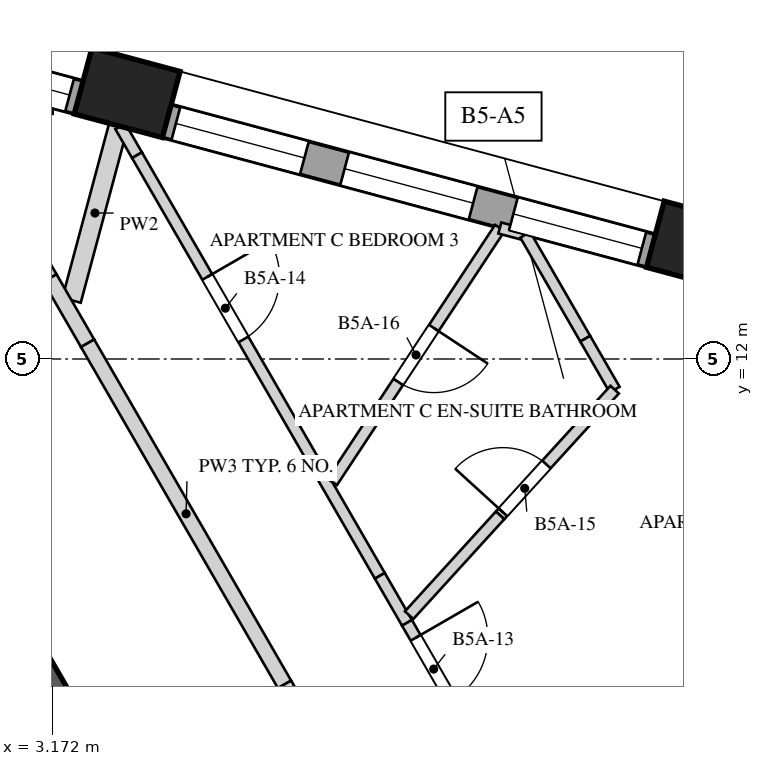
"""IFC4 building model, lengths in metres.
Left out: names, types, materials, properties, quantities, classifications, styles, units other than length and angle.
Written with IfcOpenShell. Run it as: python <this file> out.ifc"""

import sys

from ifc_helpers import new_model, si_unit, direction, frame, frame_2d, origin, origin_2d, place, context, subcontext, project, spatial, rectangle, extrude, element, fill, save


model = new_model("IFC4")
c1 = context("Model", 3, precision=1e-05, world=origin(), true_north=direction((0.0, 1.0)))
c2 = subcontext(c1, "Body", "Model", "MODEL_VIEW")
j1 = project(units=[si_unit("LENGTHUNIT", "METRE"), si_unit("PLANEANGLEUNIT", "RADIAN")], contexts=[c1])
p1 = place(None, origin())
s1 = spatial("IfcSite", under=j1, at=p1, CompositionType="ELEMENT")
p2 = place(p1, origin())
s2 = spatial("IfcBuilding", under=s1, at=p2, CompositionType="ELEMENT")
p3 = place(p2, frame((0.0, 0.0, 200.0)))
s3 = spatial("IfcBuildingStorey", under=s2, at=p3, CompositionType="ELEMENT", Elevation=200.0)
p4 = place(p3, frame((9.815, -4.25, 0.0), z_axis=(0.0, 0.0, 1.0), x_axis=(-0.500002161919, 0.866024155596, 0.0)))
e1 = element("IfcWall", 1, at=p4, inside=s3, PredefinedType="SHEAR", context=c2, shape_type="SweptSolid", body=[
    extrude(rectangle(XDim=17.176, YDim=0.75, at=frame_2d((8.588, 0.0))), origin(), (0.0, 0.0, 1.0), 4.0),
])
p5 = place(p4, frame((6.863, 0.0, 0.0)))
e2 = element("IfcOpeningElement", 2, at=p5, cuts=e1, PredefinedType="OPENING", context=c2, shape_type="SweptSolid", body=[
    extrude(rectangle(XDim=1.0, YDim=2.4, at=frame_2d((0.5, 1.2))), frame((0.0, 0.385, 0.0), z_axis=(0.0, -1.0, 0.0), x_axis=(1.0, 0.0, 0.0)), (0.0, 0.0, 1.0), 0.77),
])
for number, where, z_axis, x_axis in (
    (3, (11.683, 13.486, -0.35), (0.0, 0.0, 1.0), (-0.966, 0.259, 0.0)),
    (4, (4.154, 15.503, -0.35), (0.0, 0.0, 1.0), (-0.966, 0.259, 0.0)),
):
    element("IfcColumn", number, at=place(p3, frame(where, z_axis=z_axis, x_axis=x_axis)), inside=s3, PredefinedType="COLUMN", context=c2, shape_type="SweptSolid", body=[
        extrude(rectangle(XDim=1.2, YDim=0.9, at=origin_2d()), origin(), (0.0, 0.0, 1.0), 4.35),
    ])
p6 = place(p3, frame((11.045, 13.424, 0.0), z_axis=(0.0, 0.0, 1.0), x_axis=(-0.965933178973, 0.258791602952, 0.0)))
e5 = element("IfcWall", 5, at=p6, inside=s3, PredefinedType="SOLIDWALL", context=c2, shape_type="SweptSolid", body=[
    extrude(rectangle(XDim=6.594, YDim=0.45, at=frame_2d((3.297, 0.0))), origin(), (0.0, 0.0, 1.0), 3.3),
])
p7 = place(p6, frame((0.124, 0.0, 0.5)))
e6 = element("IfcOpeningElement", 6, at=p7, cuts=e5, PredefinedType="OPENING", context=c2, shape_type="SweptSolid", body=[
    extrude(rectangle(XDim=1.75, YDim=2.65, at=frame_2d((0.875, 1.325))), frame((0.0, 0.235, 0.0), z_axis=(0.0, -1.0, 0.0), x_axis=(1.0, 0.0, 0.0)), (0.0, 0.0, 1.0), 0.47),
])
p8 = place(p6, frame((2.422, 0.0, 0.5)))
e7 = element("IfcOpeningElement", 7, at=p8, cuts=e5, PredefinedType="OPENING", context=c2, shape_type="SweptSolid", body=[
    extrude(rectangle(XDim=1.75, YDim=2.65, at=frame_2d((0.875, 1.325))), frame((0.0, 0.235, 0.0), z_axis=(0.0, -1.0, 0.0), x_axis=(1.0, 0.0, 0.0)), (0.0, 0.0, 1.0), 0.47),
])
p9 = place(p6, frame((4.72, 0.0, 0.5)))
e8 = element("IfcOpeningElement", 8, at=p9, cuts=e5, PredefinedType="OPENING", context=c2, shape_type="SweptSolid", body=[
    extrude(rectangle(XDim=1.75, YDim=2.65, at=frame_2d((0.875, 1.325))), frame((0.0, 0.235, 0.0), z_axis=(0.0, -1.0, 0.0), x_axis=(1.0, 0.0, 0.0)), (0.0, 0.0, 1.0), 0.47),
])
p10 = place(p3, frame((3.516, 15.441, 0.0), z_axis=(0.0, 0.0, 1.0), x_axis=(-0.965933178973, 0.258791602952, 0.0)))
e9 = element("IfcWall", 9, at=p10, inside=s3, PredefinedType="SOLIDWALL", context=c2, shape_type="SweptSolid", body=[
    extrude(rectangle(XDim=6.594, YDim=0.45, at=frame_2d((3.297, 0.0))), origin(), (0.0, 0.0, 1.0), 3.3),
])
p11 = place(p10, frame((0.124, 0.0, 0.5)))
e10 = element("IfcOpeningElement", 10, at=p11, cuts=e9, PredefinedType="OPENING", context=c2, shape_type="SweptSolid", body=[
    extrude(rectangle(XDim=1.75, YDim=2.65, at=frame_2d((0.875, 1.325))), frame((0.0, 0.235, 0.0), z_axis=(0.0, -1.0, 0.0), x_axis=(1.0, 0.0, 0.0)), (0.0, 0.0, 1.0), 0.47),
])
p12 = place(p10, frame((2.422, 0.0, 0.5)))
e11 = element("IfcOpeningElement", 11, at=p12, cuts=e9, PredefinedType="OPENING", context=c2, shape_type="SweptSolid", body=[
    extrude(rectangle(XDim=1.75, YDim=2.65, at=frame_2d((0.875, 1.325))), frame((0.0, 0.235, 0.0), z_axis=(0.0, -1.0, 0.0), x_axis=(1.0, 0.0, 0.0)), (0.0, 0.0, 1.0), 0.47),
])
p13 = place(p10, frame((4.72, 0.0, 0.5)))
e12 = element("IfcOpeningElement", 12, at=p13, cuts=e9, PredefinedType="OPENING", context=c2, shape_type="SweptSolid", body=[
    extrude(rectangle(XDim=1.75, YDim=2.65, at=frame_2d((0.875, 1.325))), frame((0.0, 0.235, 0.0), z_axis=(0.0, -1.0, 0.0), x_axis=(1.0, 0.0, 0.0)), (0.0, 0.0, 1.0), 0.47),
])
p14 = place(p3, frame((3.173, 15.3, 0.0), z_axis=(0.0, 0.0, 1.0), x_axis=(-1.0, 0.0, 0.0)))
e13 = element("IfcWall", 13, at=p14, inside=s3, PredefinedType="PARTITIONING", context=c2, shape_type="SweptSolid", body=[
    extrude(rectangle(XDim=5.777, YDim=0.15, at=frame_2d((2.888, 0.0))), origin(), (0.0, 0.0, 1.0), 3.65),
])
p15 = place(p14, frame((3.075, 0.0, 0.0)))
e14 = element("IfcOpeningElement", 14, at=p15, cuts=e13, PredefinedType="OPENING", context=c2, shape_type="SweptSolid", body=[
    extrude(rectangle(XDim=0.95, YDim=2.4, at=frame_2d((0.475, 1.2))), frame((0.0, 0.085, 0.0), z_axis=(0.0, -1.0, 0.0), x_axis=(1.0, 0.0, 0.0)), (0.0, 0.0, 1.0), 0.17),
])
p16 = place(p3, frame((4.038, 15.068, 0.0), z_axis=(0.0, 0.0, 1.0), x_axis=(-0.258838766998, -0.965920541607, 0.0)))
e15 = element("IfcWall", 15, at=p16, inside=s3, PredefinedType="SOLIDWALL", context=c2, shape_type="SweptSolid", body=[
    extrude(rectangle(XDim=2.377, YDim=0.25, at=frame_2d((1.188, 0.0))), origin(), (0.0, 0.0, 1.0), 2.95),
])
p17 = place(p3, frame((4.064, 15.062, 0.0), z_axis=(0.0, 0.0, 1.0), x_axis=(0.499786622332, -0.866148562395, 0.0)))
e16 = element("IfcWall", 16, at=p17, inside=s3, PredefinedType="PARTITIONING", context=c2, shape_type="SweptSolid", body=[
    extrude(rectangle(XDim=0.439, YDim=0.15, at=frame_2d((0.22, 0.0))), origin(), (0.0, 0.0, 1.0), 2.95),
])
p18 = place(p3, frame((4.283, 14.681, 0.0), z_axis=(0.0, 0.0, 1.0), x_axis=(0.500010206181, -0.866019511163, 0.0)))
e17 = element("IfcWall", 17, at=p18, inside=s3, PredefinedType="PARTITIONING", context=c2, shape_type="SweptSolid", body=[
    extrude(rectangle(XDim=6.389, YDim=0.15, at=frame_2d((3.195, 0.0))), origin(), (0.0, 0.0, 1.0), 3.65),
])
p19 = place(p18, frame((1.849, 0.0, 0.0)))
e18 = element("IfcOpeningElement", 18, at=p19, cuts=e17, PredefinedType="OPENING", context=c2, shape_type="SweptSolid", body=[
    extrude(rectangle(XDim=0.95, YDim=2.4, at=frame_2d((0.475, 1.2))), frame((0.0, 0.085, 0.0), z_axis=(0.0, -1.0, 0.0), x_axis=(1.0, 0.0, 0.0)), (0.0, 0.0, 1.0), 0.17),
])
p20 = place(p3, frame((7.478, 9.148, 0.0), z_axis=(0.0, 0.0, 1.0), x_axis=(0.499998569178, -0.866026229868, 0.0)))
e19 = element("IfcWall", 19, at=p20, inside=s3, PredefinedType="PARTITIONING", context=c2, shape_type="SweptSolid", body=[
    extrude(rectangle(XDim=0.714, YDim=0.15, at=frame_2d((0.357, 0.0))), origin(), (0.0, 0.0, 1.0), 2.95),
])
p21 = place(p3, frame((7.835, 8.529, 0.0), z_axis=(0.0, 0.0, 1.0), x_axis=(0.49998782916, -0.866032430508, 0.0)))
e20 = element("IfcWall", 20, at=p21, inside=s3, PredefinedType="PARTITIONING", context=c2, shape_type="SweptSolid", body=[
    extrude(rectangle(XDim=2.92, YDim=0.15, at=frame_2d((1.46, 0.0))), origin(), (0.0, 0.0, 1.0), 3.65),
])
p22 = place(p21, frame((0.228, 0.0, 0.0)))
e21 = element("IfcOpeningElement", 21, at=p22, cuts=e20, PredefinedType="OPENING", context=c2, shape_type="SweptSolid", body=[
    extrude(rectangle(XDim=0.95, YDim=2.4, at=frame_2d((0.475, 1.2))), frame((0.0, 0.085, 0.0), z_axis=(0.0, -1.0, 0.0), x_axis=(1.0, 0.0, 0.0)), (0.0, 0.0, 1.0), 0.17),
])
p23 = place(p3, frame((9.057, 13.724, 0.0), z_axis=(0.0, 0.0, 1.0), x_axis=(-0.550767438832, -0.834658749623, 0.0)))
e22 = element("IfcWall", 22, at=p23, inside=s3, PredefinedType="PARTITIONING", context=c2, shape_type="SweptSolid", body=[
    extrude(rectangle(XDim=4.003, YDim=0.15, at=frame_2d((2.001, 0.0))), origin(), (0.0, 0.0, 1.0), 3.65),
])
p24 = place(p23, frame((1.577, 0.0, 0.0)))
e23 = element("IfcOpeningElement", 23, at=p24, cuts=e22, PredefinedType="OPENING", context=c2, shape_type="SweptSolid", body=[
    extrude(rectangle(XDim=0.85, YDim=2.4, at=frame_2d((0.425, 1.2))), frame((0.0, 0.085, 0.0), z_axis=(0.0, -1.0, 0.0), x_axis=(1.0, 0.0, 0.0)), (0.0, 0.0, 1.0), 0.17),
])
p25 = place(p3, frame((9.057, 13.724, 0.0), z_axis=(0.0, 0.0, 1.0), x_axis=(0.96594175785, -0.258759580387, 0.0)))
e24 = element("IfcWall", 24, at=p25, inside=s3, PredefinedType="PARTITIONING", context=c2, shape_type="SweptSolid", body=[
    extrude(rectangle(XDim=0.346, YDim=0.15, at=frame_2d((0.173, 0.0))), origin(), (0.0, 0.0, 1.0), 3.65),
])
p26 = place(p3, frame((9.391, 13.634, 0.0), z_axis=(0.0, 0.0, 1.0), x_axis=(0.500048238042, -0.865997551747, 0.0)))
e25 = element("IfcWall", 25, at=p26, inside=s3, PredefinedType="PARTITIONING", context=c2, shape_type="SweptSolid", body=[
    extrude(rectangle(XDim=1.578, YDim=0.15, at=frame_2d((0.789, 0.0))), origin(), (0.0, 0.0, 1.0), 3.65),
])
p27 = place(p3, frame((10.18, 12.267, 0.0), z_axis=(0.0, 0.0, 1.0), x_axis=(0.499804398801, -0.866138304741, 0.0)))
e26 = element("IfcWall", 26, at=p27, inside=s3, PredefinedType="PARTITIONING", context=c2, shape_type="SweptSolid", body=[
    extrude(rectangle(XDim=0.774, YDim=0.15, at=frame_2d((0.387, 0.0))), origin(), (0.0, 0.0, 1.0), 2.95),
])
p28 = place(p3, frame((9.633, 5.566, 0.0), z_axis=(0.0, 0.0, 1.0), x_axis=(0.865840987412, 0.500319282576, 0.0)))
e27 = element("IfcWall", 27, at=p28, inside=s3, PredefinedType="PARTITIONING", context=c2, shape_type="SweptSolid", body=[
    extrude(rectangle(XDim=10.928, YDim=0.15, at=frame_2d((5.464, 0.0))), origin(), (0.0, 0.0, 1.0), 2.75),
])
p29 = place(p3, frame((9.06, 9.943, 0.0), z_axis=(0.0, 0.0, 1.0), x_axis=(0.673552274043, 0.739139590423, 0.0)))
e28 = element("IfcWall", 28, at=p29, inside=s3, PredefinedType="PARTITIONING", context=c2, shape_type="SweptSolid", body=[
    extrude(rectangle(XDim=2.237, YDim=0.15, at=frame_2d((1.119, 0.0))), origin(), (0.0, 0.0, 1.0), 3.65),
])
p30 = place(p29, frame((0.055, 0.0, 0.0)))
e29 = element("IfcOpeningElement", 29, at=p30, cuts=e28, PredefinedType="OPENING", context=c2, shape_type="SweptSolid", body=[
    extrude(rectangle(XDim=0.85, YDim=2.4, at=frame_2d((0.425, 1.2))), frame((0.0, 0.085, 0.0), z_axis=(0.0, -1.0, 0.0), x_axis=(1.0, 0.0, 0.0)), (0.0, 0.0, 1.0), 0.17),
])
p31 = place(p3, frame((9.06, 9.943, 0.0), z_axis=(0.0, 0.0, 1.0), x_axis=(-0.673506679072, -0.739181136966, 0.0)))
e30 = element("IfcWall", 30, at=p31, inside=s3, PredefinedType="PARTITIONING", context=c2, shape_type="SweptSolid", body=[
    extrude(rectangle(XDim=1.777, YDim=0.15, at=frame_2d((0.888, 0.0))), origin(), (0.0, 0.0, 1.0), 2.95),
])
p32 = place(p3, frame((2.887, 13.5, 0.0), z_axis=(0.0, 0.0, 1.0), x_axis=(0.500002592159, -0.866023907196, 0.0)))
e31 = element("IfcWall", 31, at=p32, inside=s3, PredefinedType="SOLIDWALL", context=c2, shape_type="SweptSolid", body=[
    extrude(rectangle(XDim=0.503, YDim=0.2, at=frame_2d((0.251, 0.0))), origin(), (0.0, 0.0, 1.0), 3.65),
])
p33 = place(p3, frame((3.138, 13.064, 0.0), z_axis=(0.0, 0.0, 1.0), x_axis=(0.500063959222, -0.865988473761, 0.0)))
e32 = element("IfcWall", 32, at=p33, inside=s3, PredefinedType="SOLIDWALL", context=c2, shape_type="SweptSolid", body=[
    extrude(rectangle(XDim=0.99, YDim=0.2, at=frame_2d((0.495, 0.0))), origin(), (0.0, 0.0, 1.0), 2.95),
])
p34 = place(p3, frame((3.633, 12.207, 0.0), z_axis=(0.0, 0.0, 1.0), x_axis=(0.499990271856, -0.866031020258, 0.0)))
e33 = element("IfcWall", 33, at=p34, inside=s3, PredefinedType="SOLIDWALL", context=c2, shape_type="SweptSolid", body=[
    extrude(rectangle(XDim=5.182, YDim=0.2, at=frame_2d((2.591, 0.0))), origin(), (0.0, 0.0, 1.0), 3.65),
])
p35 = place(p3, frame((6.224, 7.719, 0.0), z_axis=(0.0, 0.0, 1.0), x_axis=(0.499931655587, -0.866064858854, 0.0)))
e34 = element("IfcWall", 34, at=p35, inside=s3, PredefinedType="SOLIDWALL", context=c2, shape_type="SweptSolid", body=[
    extrude(rectangle(XDim=0.741, YDim=0.2, at=frame_2d((0.37, 0.0))), origin(), (0.0, 0.0, 1.0), 2.95),
])
p36 = place(p7, origin())
e35 = element("IfcWindow", 35, at=p36, inside=s3, PartitioningType="SINGLE_PANEL", PredefinedType="WINDOW", context=c2, shape_type="SweptSolid", body=[
    extrude(rectangle(XDim=1.75, YDim=2.65, at=frame_2d((0.875, 1.325))), frame((0.0, 0.03, 0.0), z_axis=(0.0, -1.0, 0.0), x_axis=(1.0, 0.0, 0.0)), (0.0, 0.0, 1.0), 0.06),
])
fill(e6, e35)
p37 = place(p8, origin())
e36 = element("IfcWindow", 36, at=p37, inside=s3, PartitioningType="SINGLE_PANEL", PredefinedType="WINDOW", context=c2, shape_type="SweptSolid", body=[
    extrude(rectangle(XDim=1.75, YDim=2.65, at=frame_2d((0.875, 1.325))), frame((0.0, 0.03, 0.0), z_axis=(0.0, -1.0, 0.0), x_axis=(1.0, 0.0, 0.0)), (0.0, 0.0, 1.0), 0.06),
])
fill(e7, e36)
p38 = place(p9, origin())
e37 = element("IfcWindow", 37, at=p38, inside=s3, PartitioningType="SINGLE_PANEL", PredefinedType="WINDOW", context=c2, shape_type="SweptSolid", body=[
    extrude(rectangle(XDim=1.75, YDim=2.65, at=frame_2d((0.875, 1.325))), frame((0.0, 0.03, 0.0), z_axis=(0.0, -1.0, 0.0), x_axis=(1.0, 0.0, 0.0)), (0.0, 0.0, 1.0), 0.06),
])
fill(e8, e37)
p39 = place(p11, origin())
e38 = element("IfcWindow", 38, at=p39, inside=s3, PartitioningType="SINGLE_PANEL", PredefinedType="WINDOW", context=c2, shape_type="SweptSolid", body=[
    extrude(rectangle(XDim=1.75, YDim=2.65, at=frame_2d((0.875, 1.325))), frame((0.0, 0.03, 0.0), z_axis=(0.0, -1.0, 0.0), x_axis=(1.0, 0.0, 0.0)), (0.0, 0.0, 1.0), 0.06),
])
fill(e10, e38)
p40 = place(p22, origin())
e39 = element("IfcDoor", 39, at=p40, inside=s3, OperationType="SINGLE_SWING_LEFT", PredefinedType="DOOR", context=c2, shape_type="SweptSolid", body=[
    extrude(rectangle(XDim=0.95, YDim=2.4, at=frame_2d((0.475, 1.2))), frame((0.0, 0.025, 0.0), z_axis=(0.0, -1.0, 0.0), x_axis=(1.0, 0.0, 0.0)), (0.0, 0.0, 1.0), 0.05),
])
fill(e21, e39)
p41 = place(p19, origin())
e40 = element("IfcDoor", 40, at=p41, inside=s3, OperationType="SINGLE_SWING_RIGHT", PredefinedType="DOOR", context=c2, shape_type="SweptSolid", body=[
    extrude(rectangle(XDim=0.95, YDim=2.4, at=frame_2d((0.475, 1.2))), frame((0.0, 0.025, 0.0), z_axis=(0.0, -1.0, 0.0), x_axis=(1.0, 0.0, 0.0)), (0.0, 0.0, 1.0), 0.05),
])
fill(e18, e40)
p42 = place(p30, origin())
e41 = element("IfcDoor", 41, at=p42, inside=s3, OperationType="SINGLE_SWING_LEFT", PredefinedType="DOOR", context=c2, shape_type="SweptSolid", body=[
    extrude(rectangle(XDim=0.85, YDim=2.4, at=frame_2d((0.425, 1.2))), frame((0.0, 0.025, 0.0), z_axis=(0.0, -1.0, 0.0), x_axis=(1.0, 0.0, 0.0)), (0.0, 0.0, 1.0), 0.05),
])
fill(e29, e41)
p43 = place(p24, origin())
e42 = element("IfcDoor", 42, at=p43, inside=s3, OperationType="SINGLE_SWING_RIGHT", PredefinedType="DOOR", context=c2, shape_type="SweptSolid", body=[
    extrude(rectangle(XDim=0.85, YDim=2.4, at=frame_2d((0.425, 1.2))), frame((0.0, 0.025, 0.0), z_axis=(0.0, -1.0, 0.0), x_axis=(1.0, 0.0, 0.0)), (0.0, 0.0, 1.0), 0.05),
])
fill(e23, e42)
save(model, sys.argv[1])
